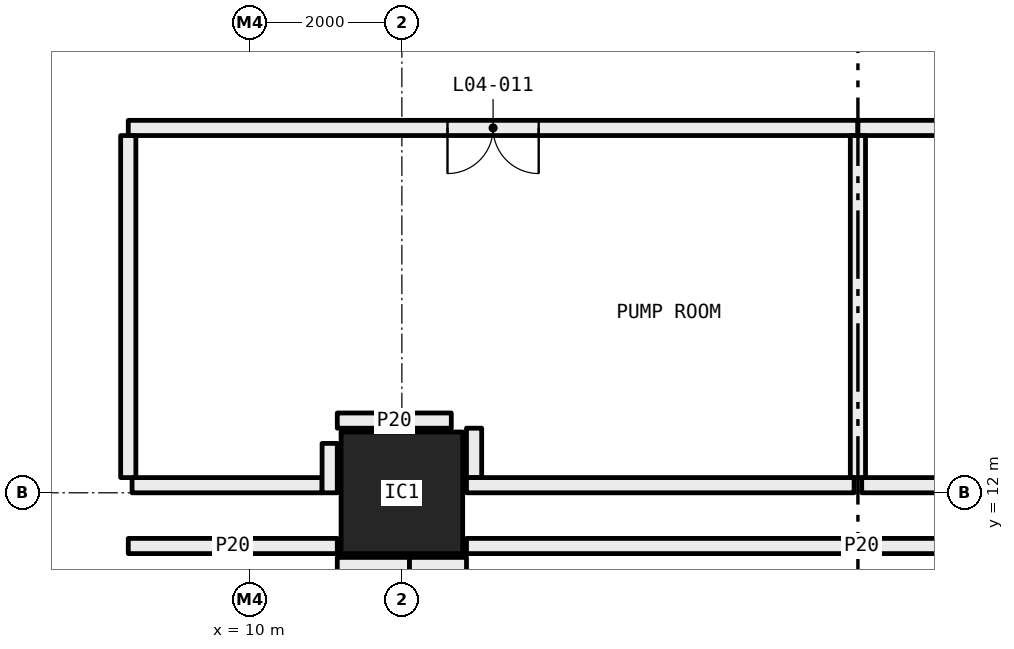
"""IFC4 building model, lengths in metres.
Left out: names, types, materials, properties, quantities, classifications, styles, units other than length and angle.
Written with IfcOpenShell. Run it as: python <this file> out.ifc"""

import sys

from ifc_helpers import new_model, si_unit, direction, frame, frame_2d, origin, origin_2d, place, context, subcontext, project, spatial, rectangle, hollow_rectangle, extrude, element, fill, save


model = new_model("IFC4")
c1 = context("Model", 3, precision=1e-05, world=origin(), true_north=direction((0.0, 1.0)))
c2 = subcontext(c1, "Body", "Model", "MODEL_VIEW")
j1 = project(units=[si_unit("LENGTHUNIT", "METRE"), si_unit("PLANEANGLEUNIT", "RADIAN")], contexts=[c1])
p1 = place(None, origin())
s1 = spatial("IfcSite", under=j1, at=p1, CompositionType="ELEMENT")
p2 = place(p1, origin())
s2 = spatial("IfcBuilding", under=s1, at=p2, CompositionType="ELEMENT")
p3 = place(p2, frame((0.0, 0.0, 24.0)))
s3 = spatial("IfcBuildingStorey", under=s2, at=p3, CompositionType="ELEMENT", Elevation=24.0)
p4 = place(p3, frame((12.0, 12.0, 0.0), z_axis=(0.0, 0.0, 1.0), x_axis=(1.0, 0.0, 0.0)))
e1 = element("IfcColumn", 1, at=p4, inside=s3, PredefinedType="COLUMN", context=c2, shape_type="SweptSolid", body=[
    extrude(hollow_rectangle(XDim=1.6, YDim=1.6, WallThickness=0.07, at=origin_2d()), origin(), (0.0, 0.0, 1.0), 5.6),
])
p5 = place(p3, frame((18.0, 16.8, 0.0), z_axis=(0.0, 0.0, 1.0), x_axis=(-1.0, 0.0, 0.0)))
e2 = element("IfcWall", 2, at=p5, inside=s3, PredefinedType="PARTITIONING", context=c2, shape_type="SweptSolid", body=[
    extrude(rectangle(XDim=9.6, YDim=0.2, at=frame_2d((4.8, 0.0))), origin(), (0.0, 0.0, 1.0), 5.6),
])
p6 = place(p5, frame((4.2, 0.0, 0.0)))
e3 = element("IfcOpeningElement", 3, at=p6, cuts=e2, PredefinedType="OPENING", context=c2, shape_type="SweptSolid", body=[
    extrude(rectangle(XDim=1.2, YDim=2.1, at=frame_2d((0.6, 1.05))), frame((0.0, 0.11, 0.0), z_axis=(0.0, -1.0, 0.0), x_axis=(1.0, 0.0, 0.0)), (0.0, 0.0, 1.0), 0.22),
])
p7 = place(p3, frame((8.4, 16.7, 0.0), z_axis=(0.0, 0.0, 1.0), x_axis=(0.0, -1.0, 0.0)))
e4 = element("IfcWall", 4, at=p7, inside=s3, PredefinedType="PARTITIONING", context=c2, shape_type="SweptSolid", body=[
    extrude(rectangle(XDim=4.5, YDim=0.2, at=frame_2d((2.25, 0.0))), origin(), (0.0, 0.0, 1.0), 5.6),
])
p8 = place(p3, frame((30.0, 16.8, 0.0), z_axis=(0.0, 0.0, 1.0), x_axis=(-1.0, 0.0, 0.0)))
e5 = element("IfcWall", 5, at=p8, inside=s3, PredefinedType="PARTITIONING", context=c2, shape_type="SweptSolid", body=[
    extrude(rectangle(XDim=12.0, YDim=0.2, at=frame_2d((6.0, 0.0))), origin(), (0.0, 0.0, 1.0), 5.6),
])
p9 = place(p8, frame((5.4, 0.0, 0.0)))
e6 = element("IfcOpeningElement", 6, at=p9, cuts=e5, PredefinedType="OPENING", context=c2, shape_type="SweptSolid", body=[
    extrude(rectangle(XDim=1.2, YDim=2.1, at=frame_2d((0.6, 1.05))), frame((0.0, 0.11, 0.0), z_axis=(0.0, -1.0, 0.0), x_axis=(1.0, 0.0, 0.0)), (0.0, 0.0, 1.0), 0.22),
])
p10 = place(p3, frame((18.0, 12.2, 0.0), z_axis=(0.0, 0.0, 1.0), x_axis=(0.0, 1.0, 0.0)))
e7 = element("IfcWall", 7, at=p10, inside=s3, PredefinedType="PARTITIONING", context=c2, shape_type="SweptSolid", body=[
    extrude(rectangle(XDim=4.5, YDim=0.2, at=frame_2d((2.25, 0.0))), origin(), (0.0, 0.0, 1.0), 5.6),
])
p11 = place(p3, frame((11.15, 11.05, 0.0), z_axis=(0.0, 0.0, 1.0), x_axis=(1.0, 0.0, 0.0)))
e8 = element("IfcWall", 8, at=p11, inside=s3, PredefinedType="PARTITIONING", context=c2, shape_type="SweptSolid", body=[
    extrude(rectangle(XDim=0.95, YDim=0.2, at=frame_2d((0.475, 0.0))), origin(), (0.0, 0.0, 1.0), 5.0),
])
p12 = place(p3, frame((12.1, 11.05, 0.0), z_axis=(0.0, 0.0, 1.0), x_axis=(1.0, 0.0, 0.0)))
e9 = element("IfcWall", 9, at=p12, inside=s3, PredefinedType="PARTITIONING", context=c2, shape_type="SweptSolid", body=[
    extrude(rectangle(XDim=0.75, YDim=0.2, at=frame_2d((0.375, 0.0))), origin(), (0.0, 0.0, 1.0), 5.6),
])
p13 = place(p3, frame((12.85, 11.3, 0.0), z_axis=(0.0, 0.0, 1.0), x_axis=(1.0, 0.0, 0.0)))
e10 = element("IfcWall", 10, at=p13, inside=s3, PredefinedType="PARTITIONING", context=c2, shape_type="SweptSolid", body=[
    extrude(rectangle(XDim=10.4, YDim=0.2, at=frame_2d((5.2, 0.0))), origin(), (0.0, 0.0, 1.0), 5.6),
])
p14 = place(p3, frame((8.4, 11.3, 0.0), z_axis=(0.0, 0.0, 1.0), x_axis=(1.0, 0.0, 0.0)))
e11 = element("IfcWall", 11, at=p14, inside=s3, PredefinedType="PARTITIONING", context=c2, shape_type="SweptSolid", body=[
    extrude(rectangle(XDim=2.75, YDim=0.2, at=frame_2d((1.375, 0.0))), origin(), (0.0, 0.0, 1.0), 5.6),
])
p15 = place(p3, frame((8.45, 12.1, 0.0), z_axis=(0.0, 0.0, 1.0), x_axis=(1.0, 0.0, 0.0)))
e12 = element("IfcWall", 12, at=p15, inside=s3, PredefinedType="PARTITIONING", context=c2, shape_type="SweptSolid", body=[
    extrude(rectangle(XDim=2.5, YDim=0.2, at=frame_2d((1.25, 0.0))), origin(), (0.0, 0.0, 1.0), 5.0),
])
p16 = place(p3, frame((11.05, 12.0, 0.0), z_axis=(0.0, 0.0, 1.0), x_axis=(0.0, 1.0, 0.0)))
e13 = element("IfcWall", 13, at=p16, inside=s3, PredefinedType="PARTITIONING", context=c2, shape_type="SweptSolid", body=[
    extrude(rectangle(XDim=0.65, YDim=0.2, at=frame_2d((0.325, 0.0))), origin(), (0.0, 0.0, 1.0), 5.0),
])
p17 = place(p3, frame((11.15, 12.95, 0.0), z_axis=(0.0, 0.0, 1.0), x_axis=(1.0, 0.0, 0.0)))
e14 = element("IfcWall", 14, at=p17, inside=s3, PredefinedType="PARTITIONING", context=c2, shape_type="SweptSolid", body=[
    extrude(rectangle(XDim=1.5, YDim=0.2, at=frame_2d((0.75, 0.0))), origin(), (0.0, 0.0, 1.0), 5.6),
])
p18 = place(p3, frame((12.95, 12.85, 0.0), z_axis=(0.0, 0.0, 1.0), x_axis=(0.0, -1.0, 0.0)))
e15 = element("IfcWall", 15, at=p18, inside=s3, PredefinedType="PARTITIONING", context=c2, shape_type="SweptSolid", body=[
    extrude(rectangle(XDim=0.65, YDim=0.2, at=frame_2d((0.325, 0.0))), origin(), (0.0, 0.0, 1.0), 5.6),
])
p19 = place(p3, frame((12.85, 12.1, 0.0), z_axis=(0.0, 0.0, 1.0), x_axis=(1.0, 0.0, 0.0)))
e16 = element("IfcWall", 16, at=p19, inside=s3, PredefinedType="PARTITIONING", context=c2, shape_type="SweptSolid", body=[
    extrude(rectangle(XDim=5.1, YDim=0.2, at=frame_2d((2.55, 0.0))), origin(), (0.0, 0.0, 1.0), 5.0),
])
p20 = place(p3, frame((18.05, 12.1, 0.0), z_axis=(0.0, 0.0, 1.0), x_axis=(1.0, 0.0, 0.0)))
e17 = element("IfcWall", 17, at=p20, inside=s3, PredefinedType="PARTITIONING", context=c2, shape_type="SweptSolid", body=[
    extrude(rectangle(XDim=5.2, YDim=0.2, at=frame_2d((2.6, 0.0))), origin(), (0.0, 0.0, 1.0), 5.0),
])
p21 = place(p6, origin())
e18 = element("IfcDoor", 18, at=p21, inside=s3, OperationType="DOUBLE_DOOR_SINGLE_SWING", PredefinedType="DOOR", context=c2, shape_type="SweptSolid", body=[
    extrude(rectangle(XDim=1.2, YDim=2.1, at=frame_2d((0.6, 1.05))), frame((0.0, 0.025, 0.0), z_axis=(0.0, -1.0, 0.0), x_axis=(1.0, 0.0, 0.0)), (0.0, 0.0, 1.0), 0.05),
])
fill(e3, e18)
save(model, sys.argv[1])
